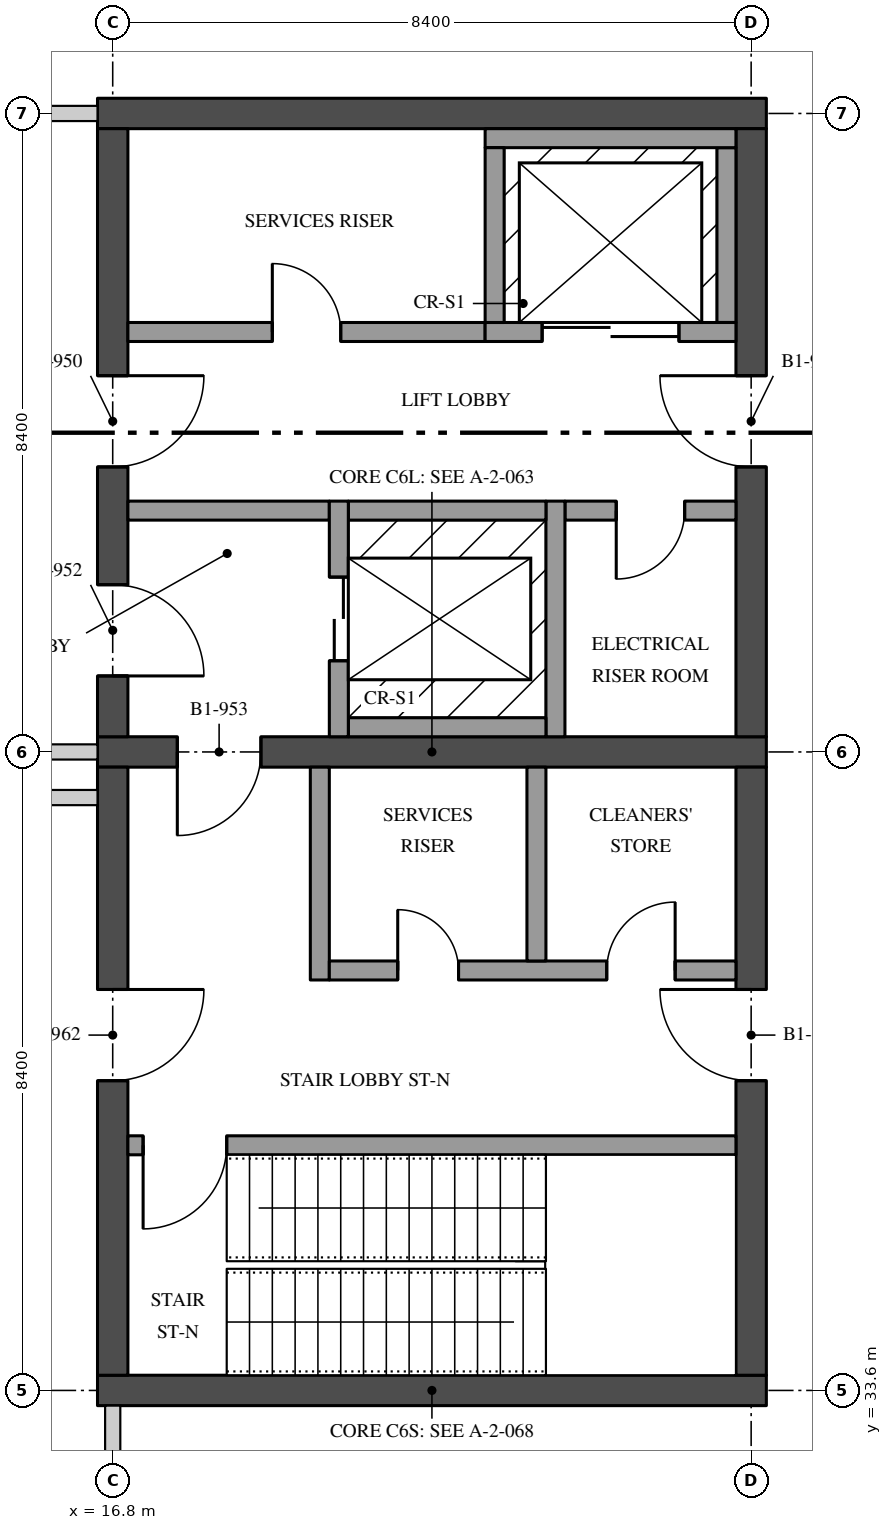
"""IFC4 building model, lengths in metres.
Left out: names, types, materials, properties, quantities, classifications, styles, units other than length and angle.
Written with IfcOpenShell. Run it as: python <this file> out.ifc"""

import sys

from ifc_helpers import new_model, si_unit, direction, frame, frame_2d, origin, place, context, subcontext, project, spatial, rectangle, extrude, element, fill, save


model = new_model("IFC4")
c1 = context("Model", 3, precision=1e-05, world=origin(), true_north=direction((0.0, 1.0)))
c2 = subcontext(c1, "Body", "Model", "MODEL_VIEW")
j1 = project(units=[si_unit("LENGTHUNIT", "METRE"), si_unit("PLANEANGLEUNIT", "RADIAN")], contexts=[c1])
p1 = place(None, origin())
s1 = spatial("IfcSite", under=j1, at=p1, CompositionType="ELEMENT")
p2 = place(p1, origin())
s2 = spatial("IfcBuilding", under=s1, at=p2, CompositionType="ELEMENT")
p3 = place(p2, frame((0.0, 0.0, -4.5)))
s3 = spatial("IfcBuildingStorey", under=s2, at=p3, CompositionType="ELEMENT", Elevation=-4.5)
p4 = place(p3, frame((16.6, 42.0, 0.0), z_axis=(0.0, 0.0, 1.0), x_axis=(1.0, 0.0, 0.0)))
e1 = element("IfcWall", 1, at=p4, inside=s3, PredefinedType="SHEAR", context=c2, shape_type="SweptSolid", body=[
    extrude(rectangle(XDim=8.8, YDim=0.4, at=frame_2d((4.4, 0.0))), origin(), (0.0, 0.0, 1.0), 4.05),
])
p5 = place(p4, frame((1.05, 0.0, 0.0)))
e2 = element("IfcOpeningElement", 2, at=p5, cuts=e1, PredefinedType="OPENING", context=c2, shape_type="SweptSolid", body=[
    extrude(rectangle(XDim=1.1, YDim=2.1, at=frame_2d((0.55, 1.05))), frame((0.0, 0.21, 0.0), z_axis=(0.0, -1.0, 0.0), x_axis=(1.0, 0.0, 0.0)), (0.0, 0.0, 1.0), 0.42),
])
p6 = place(p3, frame((16.6, 50.4, 0.0), z_axis=(0.0, 0.0, 1.0), x_axis=(1.0, 0.0, 0.0)))
e3 = element("IfcWall", 3, at=p6, inside=s3, PredefinedType="SHEAR", context=c2, shape_type="SweptSolid", body=[
    extrude(rectangle(XDim=8.8, YDim=0.4, at=frame_2d((4.4, 0.0))), origin(), (0.0, 0.0, 1.0), 4.05),
])
p7 = place(p3, frame((16.8, 42.2, 0.0), z_axis=(0.0, 0.0, 1.0), x_axis=(0.0, 1.0, 0.0)))
e4 = element("IfcWall", 4, at=p7, inside=s3, PredefinedType="SHEAR", context=c2, shape_type="SweptSolid", body=[
    extrude(rectangle(XDim=8.0, YDim=0.4, at=frame_2d((4.0, 0.0))), origin(), (0.0, 0.0, 1.0), 4.05),
])
p8 = place(p7, frame((3.55, 0.0, 0.0)))
e5 = element("IfcOpeningElement", 5, at=p8, cuts=e4, PredefinedType="OPENING", context=c2, shape_type="SweptSolid", body=[
    extrude(rectangle(XDim=1.2, YDim=2.1, at=frame_2d((0.6, 1.05))), frame((0.0, 0.21, 0.0), z_axis=(0.0, -1.0, 0.0), x_axis=(1.0, 0.0, 0.0)), (0.0, 0.0, 1.0), 0.42),
])
p9 = place(p7, frame((0.8, 0.0, 0.0)))
e6 = element("IfcOpeningElement", 6, at=p9, cuts=e4, PredefinedType="OPENING", context=c2, shape_type="SweptSolid", body=[
    extrude(rectangle(XDim=1.2, YDim=2.1, at=frame_2d((0.6, 1.05))), frame((0.0, 0.21, 0.0), z_axis=(0.0, -1.0, 0.0), x_axis=(1.0, 0.0, 0.0)), (0.0, 0.0, 1.0), 0.42),
])
p10 = place(p3, frame((25.2, 42.2, 0.0), z_axis=(0.0, 0.0, 1.0), x_axis=(0.0, 1.0, 0.0)))
e7 = element("IfcWall", 7, at=p10, inside=s3, PredefinedType="SHEAR", context=c2, shape_type="SweptSolid", body=[
    extrude(rectangle(XDim=8.0, YDim=0.4, at=frame_2d((4.0, 0.0))), origin(), (0.0, 0.0, 1.0), 4.05),
])
p11 = place(p10, frame((3.55, 0.0, 0.0)))
e8 = element("IfcOpeningElement", 8, at=p11, cuts=e7, PredefinedType="OPENING", context=c2, shape_type="SweptSolid", body=[
    extrude(rectangle(XDim=1.2, YDim=2.1, at=frame_2d((0.6, 1.05))), frame((0.0, 0.21, 0.0), z_axis=(0.0, -1.0, 0.0), x_axis=(1.0, 0.0, 0.0)), (0.0, 0.0, 1.0), 0.42),
])
p12 = place(p3, frame((21.7, 47.525, 0.0), z_axis=(0.0, 0.0, 1.0), x_axis=(-1.0, 0.0, 0.0)))
e9 = element("IfcWall", 9, at=p12, inside=s3, PredefinedType="SOLIDWALL", context=c2, shape_type="SweptSolid", body=[
    extrude(rectangle(XDim=4.7, YDim=0.25, at=frame_2d((2.35, 0.0))), origin(), (0.0, 0.0, 1.0), 4.05),
])
p13 = place(p12, frame((1.9, 0.0, 0.0)))
e10 = element("IfcOpeningElement", 10, at=p13, cuts=e9, PredefinedType="OPENING", context=c2, shape_type="SweptSolid", body=[
    extrude(rectangle(XDim=0.9, YDim=2.1, at=frame_2d((0.45, 1.05))), frame((0.0, 0.135, 0.0), z_axis=(0.0, -1.0, 0.0), x_axis=(1.0, 0.0, 0.0)), (0.0, 0.0, 1.0), 0.27),
])
p14 = place(p3, frame((25.0, 45.175, 0.0), z_axis=(0.0, 0.0, 1.0), x_axis=(-1.0, 0.0, 0.0)))
e11 = element("IfcWall", 11, at=p14, inside=s3, PredefinedType="SOLIDWALL", context=c2, shape_type="SweptSolid", body=[
    extrude(rectangle(XDim=2.25, YDim=0.25, at=frame_2d((1.125, 0.0))), origin(), (0.0, 0.0, 1.0), 4.05),
])
p15 = place(p14, frame((0.675, 0.0, 0.0)))
e12 = element("IfcOpeningElement", 12, at=p15, cuts=e11, PredefinedType="OPENING", context=c2, shape_type="SweptSolid", body=[
    extrude(rectangle(XDim=0.9, YDim=2.1, at=frame_2d((0.45, 1.05))), frame((0.0, 0.135, 0.0), z_axis=(0.0, -1.0, 0.0), x_axis=(1.0, 0.0, 0.0)), (0.0, 0.0, 1.0), 0.27),
])
p16 = place(p3, frame((19.65, 45.175, 0.0), z_axis=(0.0, 0.0, 1.0), x_axis=(-1.0, 0.0, 0.0)))
e13 = element("IfcWall", 13, at=p16, inside=s3, PredefinedType="SOLIDWALL", context=c2, shape_type="SweptSolid", body=[
    extrude(rectangle(XDim=2.65, YDim=0.25, at=frame_2d((1.325, 0.0))), origin(), (0.0, 0.0, 1.0), 4.05),
])
p17 = place(p3, frame((16.6, 33.6, 0.0), z_axis=(0.0, 0.0, 1.0), x_axis=(1.0, 0.0, 0.0)))
e14 = element("IfcWall", 14, at=p17, inside=s3, PredefinedType="SHEAR", context=c2, shape_type="SweptSolid", body=[
    extrude(rectangle(XDim=8.8, YDim=0.4, at=frame_2d((4.4, 0.0))), origin(), (0.0, 0.0, 1.0), 4.05),
])
p18 = place(p3, frame((16.8, 33.8, 0.0), z_axis=(0.0, 0.0, 1.0), x_axis=(0.0, 1.0, 0.0)))
e15 = element("IfcWall", 15, at=p18, inside=s3, PredefinedType="SHEAR", context=c2, shape_type="SweptSolid", body=[
    extrude(rectangle(XDim=8.0, YDim=0.4, at=frame_2d((4.0, 0.0))), origin(), (0.0, 0.0, 1.0), 4.05),
])
p19 = place(p18, frame((3.875, 0.0, 0.0)))
e16 = element("IfcOpeningElement", 16, at=p19, cuts=e15, PredefinedType="OPENING", context=c2, shape_type="SweptSolid", body=[
    extrude(rectangle(XDim=1.2, YDim=2.1, at=frame_2d((0.6, 1.05))), frame((0.0, 0.21, 0.0), z_axis=(0.0, -1.0, 0.0), x_axis=(1.0, 0.0, 0.0)), (0.0, 0.0, 1.0), 0.42),
])
p20 = place(p3, frame((25.2, 33.8, 0.0), z_axis=(0.0, 0.0, 1.0), x_axis=(0.0, 1.0, 0.0)))
e17 = element("IfcWall", 17, at=p20, inside=s3, PredefinedType="SHEAR", context=c2, shape_type="SweptSolid", body=[
    extrude(rectangle(XDim=8.0, YDim=0.4, at=frame_2d((4.0, 0.0))), origin(), (0.0, 0.0, 1.0), 4.05),
])
p21 = place(p20, frame((3.875, 0.0, 0.0)))
e18 = element("IfcOpeningElement", 18, at=p21, cuts=e17, PredefinedType="OPENING", context=c2, shape_type="SweptSolid", body=[
    extrude(rectangle(XDim=1.2, YDim=2.1, at=frame_2d((0.6, 1.05))), frame((0.0, 0.21, 0.0), z_axis=(0.0, -1.0, 0.0), x_axis=(1.0, 0.0, 0.0)), (0.0, 0.0, 1.0), 0.42),
])
p22 = place(p3, frame((17.0, 36.825, 0.0), z_axis=(0.0, 0.0, 1.0), x_axis=(1.0, 0.0, 0.0)))
e19 = element("IfcWall", 19, at=p22, inside=s3, PredefinedType="SOLIDWALL", context=c2, shape_type="SweptSolid", body=[
    extrude(rectangle(XDim=8.0, YDim=0.25, at=frame_2d((4.0, 0.0))), origin(), (0.0, 0.0, 1.0), 4.05),
])
p23 = place(p22, frame((0.2, 0.0, 0.0)))
e20 = element("IfcOpeningElement", 20, at=p23, cuts=e19, PredefinedType="OPENING", context=c2, shape_type="SweptSolid", body=[
    extrude(rectangle(XDim=1.1, YDim=2.1, at=frame_2d((0.55, 1.05))), frame((0.0, 0.135, 0.0), z_axis=(0.0, -1.0, 0.0), x_axis=(1.0, 0.0, 0.0)), (0.0, 0.0, 1.0), 0.27),
])
p24 = place(p3, frame((19.525, 39.0, 0.0), z_axis=(0.0, 0.0, 1.0), x_axis=(0.0, 1.0, 0.0)))
e21 = element("IfcWall", 21, at=p24, inside=s3, PredefinedType="SOLIDWALL", context=c2, shape_type="SweptSolid", body=[
    extrude(rectangle(XDim=2.8, YDim=0.25, at=frame_2d((1.4, 0.0))), origin(), (0.0, 0.0, 1.0), 4.05),
])
p25 = place(p3, frame((19.65, 39.125, 0.0), z_axis=(0.0, 0.0, 1.0), x_axis=(1.0, 0.0, 0.0)))
e22 = element("IfcWall", 22, at=p25, inside=s3, PredefinedType="SOLIDWALL", context=c2, shape_type="SweptSolid", body=[
    extrude(rectangle(XDim=5.35, YDim=0.25, at=frame_2d((2.675, 0.0))), origin(), (0.0, 0.0, 1.0), 4.05),
])
p26 = place(p25, frame((3.65, 0.0, 0.0)))
e23 = element("IfcOpeningElement", 23, at=p26, cuts=e22, PredefinedType="OPENING", context=c2, shape_type="SweptSolid", body=[
    extrude(rectangle(XDim=0.9, YDim=2.1, at=frame_2d((0.45, 1.05))), frame((0.0, 0.135, 0.0), z_axis=(0.0, -1.0, 0.0), x_axis=(1.0, 0.0, 0.0)), (0.0, 0.0, 1.0), 0.27),
])
p27 = place(p25, frame((0.9, 0.0, 0.0)))
e24 = element("IfcOpeningElement", 24, at=p27, cuts=e22, PredefinedType="OPENING", context=c2, shape_type="SweptSolid", body=[
    extrude(rectangle(XDim=0.8, YDim=2.1, at=frame_2d((0.4, 1.05))), frame((0.0, 0.135, 0.0), z_axis=(0.0, -1.0, 0.0), x_axis=(1.0, 0.0, 0.0)), (0.0, 0.0, 1.0), 0.27),
])
p28 = place(p3, frame((22.375, 39.25, 0.0), z_axis=(0.0, 0.0, 1.0), x_axis=(0.0, 1.0, 0.0)))
e25 = element("IfcWall", 25, at=p28, inside=s3, PredefinedType="SOLIDWALL", context=c2, shape_type="SweptSolid", body=[
    extrude(rectangle(XDim=2.55, YDim=0.25, at=frame_2d((1.275, 0.0))), origin(), (0.0, 0.0, 1.0), 4.05),
])
p29 = place(p3, frame((24.875, 47.65, 0.0), z_axis=(0.0, 0.0, 1.0), x_axis=(0.0, 1.0, 0.0)))
e26 = element("IfcWall", 26, at=p29, inside=s3, PredefinedType="SOLIDWALL", context=c2, shape_type="SweptSolid", body=[
    extrude(rectangle(XDim=2.3, YDim=0.25, at=frame_2d((1.15, 0.0))), origin(), (0.0, 0.0, 1.0), 4.05),
])
p30 = place(p3, frame((21.7, 50.075, 0.0), z_axis=(0.0, 0.0, 1.0), x_axis=(1.0, 0.0, 0.0)))
e27 = element("IfcWall", 27, at=p30, inside=s3, PredefinedType="SOLIDWALL", context=c2, shape_type="SweptSolid", body=[
    extrude(rectangle(XDim=3.3, YDim=0.25, at=frame_2d((1.65, 0.0))), origin(), (0.0, 0.0, 1.0), 4.05),
])
p31 = place(p3, frame((21.7, 47.525, 0.0), z_axis=(0.0, 0.0, 1.0), x_axis=(1.0, 0.0, 0.0)))
e28 = element("IfcWall", 28, at=p31, inside=s3, PredefinedType="SOLIDWALL", context=c2, shape_type="SweptSolid", body=[
    extrude(rectangle(XDim=3.3, YDim=0.25, at=frame_2d((1.65, 0.0))), origin(), (0.0, 0.0, 1.0), 4.05),
])
p32 = place(p31, frame((0.75, 0.0, 0.0)))
e29 = element("IfcOpeningElement", 29, at=p32, cuts=e28, PredefinedType="OPENING", context=c2, shape_type="SweptSolid", body=[
    extrude(rectangle(XDim=1.8, YDim=2.1, at=frame_2d((0.9, 1.05))), frame((0.0, 0.135, 0.0), z_axis=(0.0, -1.0, 0.0), x_axis=(1.0, 0.0, 0.0)), (0.0, 0.0, 1.0), 0.27),
])
p33 = place(p3, frame((21.825, 47.65, 0.0), z_axis=(0.0, 0.0, 1.0), x_axis=(0.0, 1.0, 0.0)))
e30 = element("IfcWall", 30, at=p33, inside=s3, PredefinedType="SOLIDWALL", context=c2, shape_type="SweptSolid", body=[
    extrude(rectangle(XDim=2.3, YDim=0.25, at=frame_2d((1.15, 0.0))), origin(), (0.0, 0.0, 1.0), 4.05),
])
p34 = place(p3, frame((22.625, 42.2, 0.0), z_axis=(0.0, 0.0, 1.0), x_axis=(0.0, 1.0, 0.0)))
e31 = element("IfcWall", 31, at=p34, inside=s3, PredefinedType="SOLIDWALL", context=c2, shape_type="SweptSolid", body=[
    extrude(rectangle(XDim=3.1, YDim=0.25, at=frame_2d((1.55, 0.0))), origin(), (0.0, 0.0, 1.0), 4.05),
])
for number, where, z_axis, x_axis in (
    (32, (19.9, 45.175, 0.0), (0.0, 0.0, 1.0), (1.0, 0.0, 0.0)),
    (33, (19.9, 42.325, 0.0), (0.0, 0.0, 1.0), (1.0, 0.0, 0.0)),
):
    element("IfcWall", number, at=place(p3, frame(where, z_axis=z_axis, x_axis=x_axis)), inside=s3, PredefinedType="SOLIDWALL", context=c2, shape_type="SweptSolid", body=[
        extrude(rectangle(XDim=2.6, YDim=0.25, at=frame_2d((1.3, 0.0))), origin(), (0.0, 0.0, 1.0), 4.05),
    ])
p35 = place(p3, frame((19.775, 42.2, 0.0), z_axis=(0.0, 0.0, 1.0), x_axis=(0.0, 1.0, 0.0)))
e34 = element("IfcWall", 34, at=p35, inside=s3, PredefinedType="SOLIDWALL", context=c2, shape_type="SweptSolid", body=[
    extrude(rectangle(XDim=3.1, YDim=0.25, at=frame_2d((1.55, 0.0))), origin(), (0.0, 0.0, 1.0), 4.05),
])
p36 = place(p35, frame((1.0, 0.0, 0.0)))
e35 = element("IfcOpeningElement", 35, at=p36, cuts=e34, PredefinedType="OPENING", context=c2, shape_type="SweptSolid", body=[
    extrude(rectangle(XDim=1.1, YDim=2.1, at=frame_2d((0.55, 1.05))), frame((0.0, 0.135, 0.0), z_axis=(0.0, -1.0, 0.0), x_axis=(1.0, 0.0, 0.0)), (0.0, 0.0, 1.0), 0.27),
])
for number, where, z_axis, x_axis in (
    (36, (8.85, 50.4, 0.0), (0.0, 0.0, 1.0), (1.0, 0.0, 0.0)),
    (37, (8.85, 42.0, 0.0), (0.0, 0.0, 1.0), (1.0, 0.0, 0.0)),
):
    element("IfcWall", number, at=place(p3, frame(where, z_axis=z_axis, x_axis=x_axis)), inside=s3, PredefinedType="PARTITIONING", context=c2, shape_type="SweptSolid", body=[
        extrude(rectangle(XDim=7.75, YDim=0.2, at=frame_2d((3.875, 0.0))), origin(), (0.0, 0.0, 1.0), 4.05),
    ])
p37 = place(p3, frame((8.1, 41.4, 0.0), z_axis=(0.0, 0.0, 1.0), x_axis=(1.0, 0.0, 0.0)))
e38 = element("IfcWall", 38, at=p37, inside=s3, PredefinedType="PARTITIONING", context=c2, shape_type="SweptSolid", body=[
    extrude(rectangle(XDim=8.5, YDim=0.2, at=frame_2d((4.25, 0.0))), origin(), (0.0, 0.0, 1.0), 4.05),
])
p38 = place(p3, frame((16.8, 25.7, 0.0), z_axis=(0.0, 0.0, 1.0), x_axis=(0.0, 1.0, 0.0)))
e39 = element("IfcWall", 39, at=p38, inside=s3, PredefinedType="PARTITIONING", context=c2, shape_type="SweptSolid", body=[
    extrude(rectangle(XDim=7.7, YDim=0.2, at=frame_2d((3.85, 0.0))), origin(), (0.0, 0.0, 1.0), 4.05),
])
p39 = place(p38, frame((3.8, 0.0, 0.0)))
e40 = element("IfcOpeningElement", 40, at=p39, cuts=e39, PredefinedType="OPENING", context=c2, shape_type="SweptSolid", body=[
    extrude(rectangle(XDim=1.0, YDim=2.1, at=frame_2d((0.5, 1.05))), frame((0.0, 0.11, 0.0), z_axis=(0.0, -1.0, 0.0), x_axis=(1.0, 0.0, 0.0)), (0.0, 0.0, 1.0), 0.22),
])
p40 = place(p8, frame((1.2, 0.0, 0.0), z_axis=(0.0, 0.0, 1.0), x_axis=(-1.0, 0.0, 0.0)))
e41 = element("IfcDoor", 41, at=p40, inside=s3, OperationType="SINGLE_SWING_RIGHT", PredefinedType="DOOR", context=c2, shape_type="SweptSolid", body=[
    extrude(rectangle(XDim=1.2, YDim=2.1, at=frame_2d((0.6, 1.05))), frame((0.0, 0.035, 0.0), z_axis=(0.0, -1.0, 0.0), x_axis=(1.0, 0.0, 0.0)), (0.0, 0.0, 1.0), 0.07),
])
fill(e5, e41)
p41 = place(p11, origin())
e42 = element("IfcDoor", 42, at=p41, inside=s3, OperationType="SINGLE_SWING_LEFT", PredefinedType="DOOR", context=c2, shape_type="SweptSolid", body=[
    extrude(rectangle(XDim=1.2, YDim=2.1, at=frame_2d((0.6, 1.05))), frame((0.0, 0.035, 0.0), z_axis=(0.0, -1.0, 0.0), x_axis=(1.0, 0.0, 0.0)), (0.0, 0.0, 1.0), 0.07),
])
fill(e8, e42)
p42 = place(p9, frame((1.2, 0.0, 0.0), z_axis=(0.0, 0.0, 1.0), x_axis=(-1.0, 0.0, 0.0)))
e43 = element("IfcDoor", 43, at=p42, inside=s3, OperationType="SINGLE_SWING_LEFT", PredefinedType="DOOR", context=c2, shape_type="SweptSolid", body=[
    extrude(rectangle(XDim=1.2, YDim=2.1, at=frame_2d((0.6, 1.05))), frame((0.0, 0.035, 0.0), z_axis=(0.0, -1.0, 0.0), x_axis=(1.0, 0.0, 0.0)), (0.0, 0.0, 1.0), 0.07),
])
fill(e6, e43)
p43 = place(p5, frame((1.1, 0.0, 0.0), z_axis=(0.0, 0.0, 1.0), x_axis=(-1.0, 0.0, 0.0)))
e44 = element("IfcDoor", 44, at=p43, inside=s3, OperationType="SINGLE_SWING_LEFT", PredefinedType="DOOR", context=c2, shape_type="SweptSolid", body=[
    extrude(rectangle(XDim=1.1, YDim=2.1, at=frame_2d((0.55, 1.05))), frame((0.0, 0.035, 0.0), z_axis=(0.0, -1.0, 0.0), x_axis=(1.0, 0.0, 0.0)), (0.0, 0.0, 1.0), 0.07),
])
fill(e2, e44)
p44 = place(p13, frame((0.9, 0.0, 0.0), z_axis=(0.0, 0.0, 1.0), x_axis=(-1.0, 0.0, 0.0)))
e45 = element("IfcDoor", 45, at=p44, inside=s3, OperationType="SINGLE_SWING_RIGHT", PredefinedType="DOOR", context=c2, shape_type="SweptSolid", body=[
    extrude(rectangle(XDim=0.9, YDim=2.1, at=frame_2d((0.45, 1.05))), frame((0.0, 0.035, 0.0), z_axis=(0.0, -1.0, 0.0), x_axis=(1.0, 0.0, 0.0)), (0.0, 0.0, 1.0), 0.07),
])
fill(e10, e45)
p45 = place(p15, origin())
e46 = element("IfcDoor", 46, at=p45, inside=s3, OperationType="SINGLE_SWING_LEFT", PredefinedType="DOOR", context=c2, shape_type="SweptSolid", body=[
    extrude(rectangle(XDim=0.9, YDim=2.1, at=frame_2d((0.45, 1.05))), frame((0.0, 0.05, 0.0), z_axis=(0.0, -1.0, 0.0), x_axis=(1.0, 0.0, 0.0)), (0.0, 0.0, 1.0), 0.1),
])
fill(e12, e46)
p46 = place(p26, origin())
e47 = element("IfcDoor", 47, at=p46, inside=s3, OperationType="SINGLE_SWING_LEFT", PredefinedType="DOOR", context=c2, shape_type="SweptSolid", body=[
    extrude(rectangle(XDim=0.9, YDim=2.1, at=frame_2d((0.45, 1.05))), frame((0.0, 0.035, 0.0), z_axis=(0.0, -1.0, 0.0), x_axis=(1.0, 0.0, 0.0)), (0.0, 0.0, 1.0), 0.07),
])
fill(e23, e47)
p47 = place(p19, frame((1.2, 0.0, 0.0), z_axis=(0.0, 0.0, 1.0), x_axis=(-1.0, 0.0, 0.0)))
e48 = element("IfcDoor", 48, at=p47, inside=s3, OperationType="SINGLE_SWING_RIGHT", PredefinedType="DOOR", context=c2, shape_type="SweptSolid", body=[
    extrude(rectangle(XDim=1.2, YDim=2.1, at=frame_2d((0.6, 1.05))), frame((0.0, 0.035, 0.0), z_axis=(0.0, -1.0, 0.0), x_axis=(1.0, 0.0, 0.0)), (0.0, 0.0, 1.0), 0.07),
])
fill(e16, e48)
p48 = place(p21, origin())
e49 = element("IfcDoor", 49, at=p48, inside=s3, OperationType="SINGLE_SWING_LEFT", PredefinedType="DOOR", context=c2, shape_type="SweptSolid", body=[
    extrude(rectangle(XDim=1.2, YDim=2.1, at=frame_2d((0.6, 1.05))), frame((0.0, 0.035, 0.0), z_axis=(0.0, -1.0, 0.0), x_axis=(1.0, 0.0, 0.0)), (0.0, 0.0, 1.0), 0.07),
])
fill(e18, e49)
p49 = place(p27, origin())
e50 = element("IfcDoor", 50, at=p49, inside=s3, OperationType="SINGLE_SWING_RIGHT", PredefinedType="DOOR", context=c2, shape_type="SweptSolid", body=[
    extrude(rectangle(XDim=0.8, YDim=2.1, at=frame_2d((0.4, 1.05))), frame((0.0, 0.035, 0.0), z_axis=(0.0, -1.0, 0.0), x_axis=(1.0, 0.0, 0.0)), (0.0, 0.0, 1.0), 0.07),
])
fill(e24, e50)
p50 = place(p23, frame((1.1, 0.0, 0.0), z_axis=(0.0, 0.0, 1.0), x_axis=(-1.0, 0.0, 0.0)))
e51 = element("IfcDoor", 51, at=p50, inside=s3, OperationType="SINGLE_SWING_LEFT", PredefinedType="DOOR", context=c2, shape_type="SweptSolid", body=[
    extrude(rectangle(XDim=1.1, YDim=2.1, at=frame_2d((0.55, 1.05))), frame((0.0, 0.035, 0.0), z_axis=(0.0, -1.0, 0.0), x_axis=(1.0, 0.0, 0.0)), (0.0, 0.0, 1.0), 0.07),
])
fill(e20, e51)
p51 = place(p32, origin())
e52 = element("IfcDoor", 52, at=p51, inside=s3, OperationType="DOUBLE_DOOR_SLIDING", PredefinedType="DOOR", context=c2, shape_type="SweptSolid", body=[
    extrude(rectangle(XDim=1.8, YDim=2.1, at=frame_2d((0.9, 1.05))), frame((0.0, 0.04, 0.0), z_axis=(0.0, -1.0, 0.0), x_axis=(1.0, 0.0, 0.0)), (0.0, 0.0, 1.0), 0.08),
])
fill(e29, e52)
p52 = place(p36, origin())
e53 = element("IfcDoor", 53, at=p52, inside=s3, OperationType="DOUBLE_DOOR_SLIDING", PredefinedType="DOOR", context=c2, shape_type="SweptSolid", body=[
    extrude(rectangle(XDim=1.1, YDim=2.1, at=frame_2d((0.55, 1.05))), frame((0.0, 0.04, 0.0), z_axis=(0.0, -1.0, 0.0), x_axis=(1.0, 0.0, 0.0)), (0.0, 0.0, 1.0), 0.08),
])
fill(e35, e53)
save(model, sys.argv[1])
